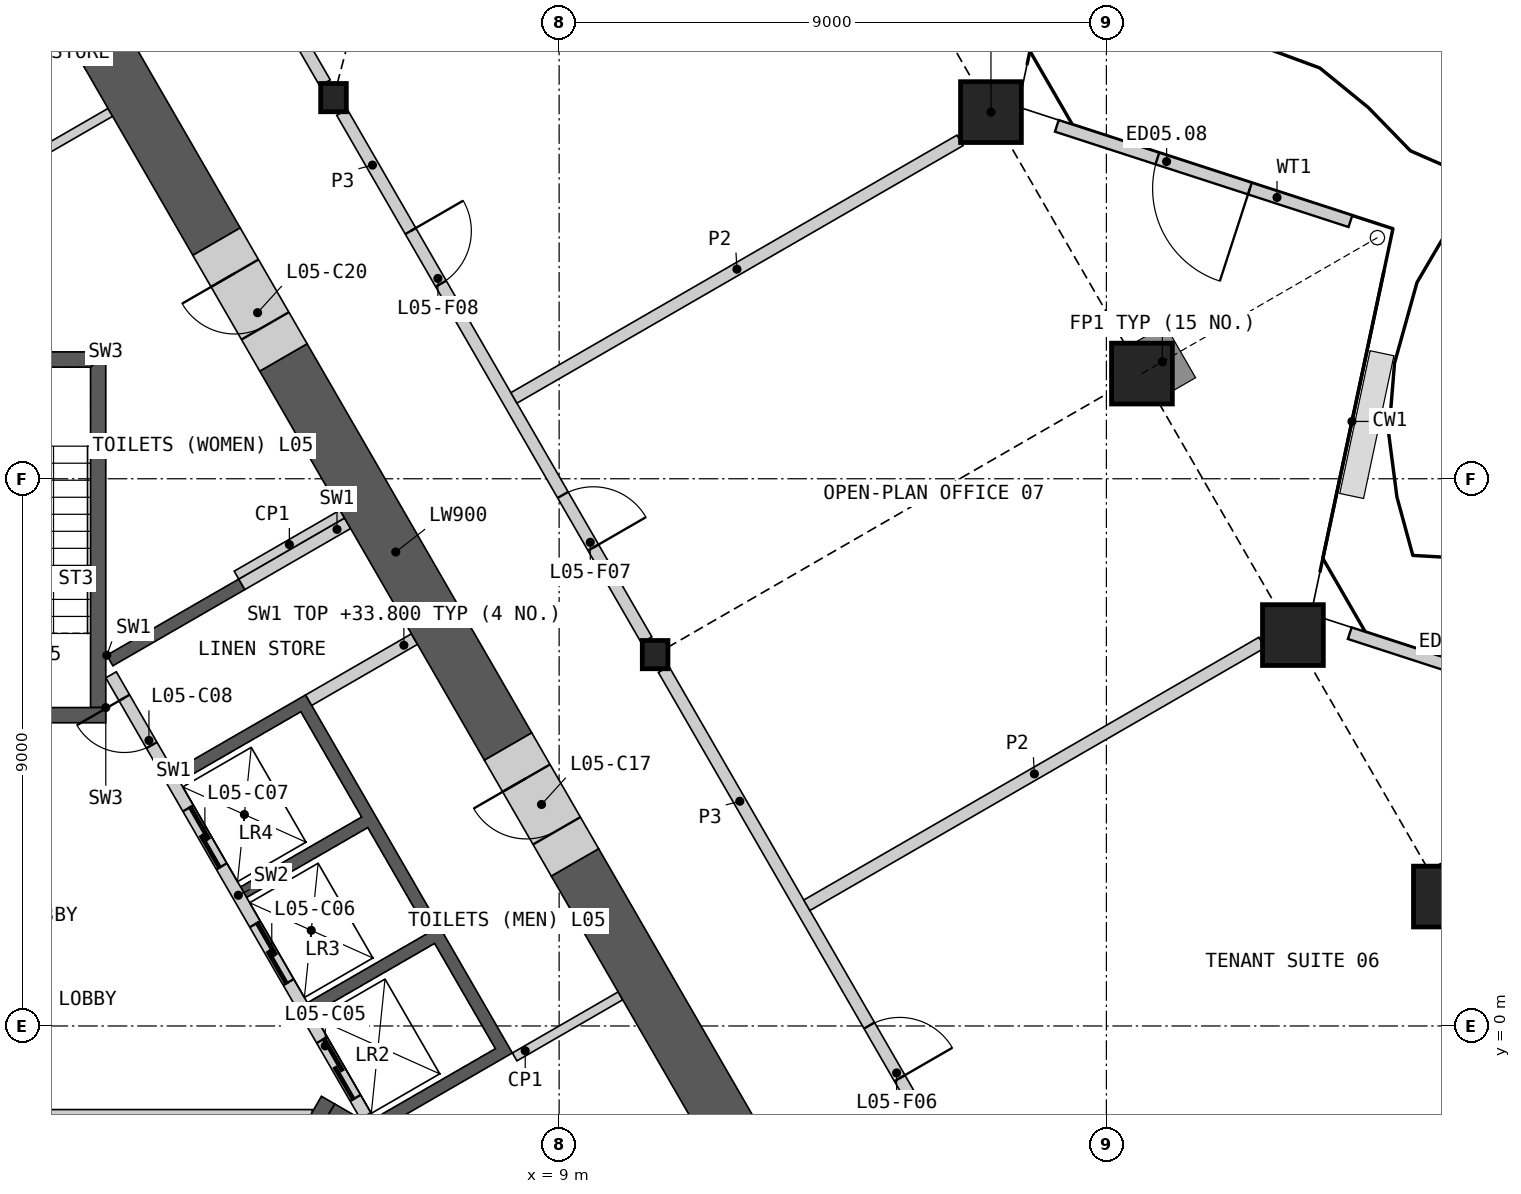
"""IFC4 building model, lengths in metres.
Left out: names, types, materials, properties, quantities, classifications, styles, units other than length and angle.
Written with IfcOpenShell. Run it as: python <this file> out.ifc"""

import sys

from ifc_helpers import new_model, si_unit, direction, frame, frame_2d, origin, origin_2d, place, context, subcontext, project, spatial, polyline, rectangle, hollow_rectangle, i_section, outline, extrude, element, fill, save


model = new_model("IFC4")
c1 = context("Model", 3, precision=1e-05, world=origin(), true_north=direction((0.0, 1.0)))
c2 = subcontext(c1, "Body", "Model", "MODEL_VIEW")
j1 = project(units=[si_unit("LENGTHUNIT", "METRE"), si_unit("PLANEANGLEUNIT", "RADIAN")], contexts=[c1])
p1 = place(None, origin())
s1 = spatial("IfcSite", under=j1, at=p1, CompositionType="ELEMENT")
p2 = place(p1, origin())
s2 = spatial("IfcBuilding", under=s1, at=p2, CompositionType="ELEMENT")
p3 = place(p2, frame((0.0, 0.0, 30.0)))
s3 = spatial("IfcBuildingStorey", under=s2, at=p3, CompositionType="ELEMENT", Elevation=30.0)
p4 = place(p3, frame((23.551, 2.128, 0.0), z_axis=(0.631248593533, 0.36445433234, 0.684615405028), x_axis=(-0.500002867593, 0.866023748172, 0.0)))
e1 = element("IfcColumn", 1, at=p4, inside=s3, PredefinedType="COLUMN", context=c2, shape_type="SweptSolid", body=[
    extrude(hollow_rectangle(XDim=1.0, YDim=1.0, WallThickness=0.07, at=origin_2d()), frame((0.0, 0.0, 0.532)), (0.0, 0.0, 1.0), 5.07),
])
p5 = place(p3, frame((21.068, 6.429, 0.0), z_axis=(0.0, 0.0, 1.0), x_axis=(1.0, 0.0, 0.0)))
e2 = element("IfcColumn", 2, at=p5, inside=s3, PredefinedType="COLUMN", context=c2, shape_type="SweptSolid", body=[
    extrude(hollow_rectangle(XDim=1.0, YDim=1.0, WallThickness=0.07, at=origin_2d()), origin(), (0.0, 0.0, 1.0), 4.2),
])
p6 = place(p3, frame((18.585, 10.73, 0.0), z_axis=(0.631257748816, 0.364419821328, 0.684625334313), x_axis=(-0.499961918033, 0.866047389302, 0.0)))
e3 = element("IfcColumn", 3, at=p6, inside=s3, PredefinedType="COLUMN", context=c2, shape_type="SweptSolid", body=[
    extrude(hollow_rectangle(XDim=1.0, YDim=1.0, WallThickness=0.07, at=origin_2d()), frame((0.0, 0.0, 0.532)), (0.0, 0.0, 1.0), 5.07),
])
p7 = place(p3, frame((16.102, 15.031, 0.0), z_axis=(0.0, 0.0, 1.0), x_axis=(1.0, 0.0, 0.0)))
e4 = element("IfcColumn", 4, at=p7, inside=s3, PredefinedType="COLUMN", context=c2, shape_type="SweptSolid", body=[
    extrude(hollow_rectangle(XDim=1.0, YDim=1.0, WallThickness=0.07, at=origin_2d()), origin(), (0.0, 0.0, 1.0), 4.2),
])
for number, where, z_axis, x_axis in (
    (5, (10.578, 6.107, 0.0), (0.0, 0.0, 1.0), (1.0, 0.0, 0.0)),
    (6, (5.289, 15.269, 0.0), (0.0, 0.0, 1.0), (1.0, 0.0, 0.0)),
):
    element("IfcColumn", number, at=place(p3, frame(where, z_axis=z_axis, x_axis=x_axis)), inside=s3, PredefinedType="COLUMN", context=c2, shape_type="SweptSolid", body=[
        extrude(i_section(OverallWidth=0.421, OverallDepth=0.465, WebThickness=0.045, FlangeThickness=0.072, at=origin_2d()), origin(), (0.0, 0.0, 1.0), 4.2),
    ])
p8 = place(p3, frame((26.851, 4.885, 0.0), z_axis=(0.0, 0.0, 1.0), x_axis=(-0.951055181617, 0.309021102063, 0.0)))
e7 = element("IfcWall", 7, at=p8, inside=s3, PredefinedType="SOLIDWALL", context=c2, shape_type="SweptSolid", body=[
    extrude(rectangle(XDim=5.098, YDim=0.2, at=frame_2d((2.549, 0.0))), origin(), (0.0, 0.0, 1.0), 3.189),
])
p9 = place(p8, frame((1.76, 0.0, 0.0)))
e8 = element("IfcOpeningElement", 8, at=p9, cuts=e7, PredefinedType="OPENING", context=c2, shape_type="SweptSolid", body=[
    extrude(rectangle(XDim=1.6, YDim=2.4, at=frame_2d((0.8, 1.2))), frame((0.0, 0.11, 0.0), z_axis=(0.0, -1.0, 0.0), x_axis=(1.0, 0.0, 0.0)), (0.0, 0.0, 1.0), 0.22),
])
p10 = place(p3, frame((22.013, 13.235, 0.0), z_axis=(0.0, 0.0, 1.0), x_axis=(-0.951051031059, 0.309033875687, 0.0)))
e9 = element("IfcWall", 9, at=p10, inside=s3, PredefinedType="SOLIDWALL", context=c2, shape_type="SweptSolid", body=[
    extrude(rectangle(XDim=5.077, YDim=0.2, at=frame_2d((2.538, 0.0))), origin(), (0.0, 0.0, 1.0), 3.189),
])
p11 = place(p10, frame((1.738, 0.0, 0.0)))
e10 = element("IfcOpeningElement", 10, at=p11, cuts=e9, PredefinedType="OPENING", context=c2, shape_type="SweptSolid", body=[
    extrude(rectangle(XDim=1.6, YDim=2.4, at=frame_2d((0.8, 1.2))), frame((0.0, 0.11, 0.0), z_axis=(0.0, -1.0, 0.0), x_axis=(1.0, 0.0, 0.0)), (0.0, 0.0, 1.0), 0.22),
])
p12 = place(p3, origin())
e11 = element("IfcWall", 11, at=p12, inside=s3, PredefinedType="SHEAR", context=c2, shape_type="SweptSolid", body=[
    extrude(outline(polyline([(1.561, 6.097), (3.731, 7.35), (3.831, 7.177), (1.66, 5.924), (1.561, 6.097)])), origin(), (0.0, 0.0, 1.0), 3.8),
])
p13 = place(p3, origin())
e12 = element("IfcWall", 12, at=p13, inside=s3, PredefinedType="SHEAR", context=c2, shape_type="SweptSolid", body=[
    extrude(outline(polyline([(2.66, 4.192), (4.831, 5.445), (8.231, -0.444), (6.061, -1.697), (5.96, -1.524), (7.952, -0.374), (6.952, 1.358), (4.96, 0.208), (4.861, 0.381), (6.852, 1.531), (5.852, 3.263), (3.861, 2.113), (3.76, 2.287), (5.752, 3.437), (4.752, 5.169), (2.76, 4.019), (2.66, 4.192)])), origin(), (0.0, 0.0, 1.0), 3.8),
])
p14 = place(p3, frame((5.817, -1.476, 0.0), z_axis=(0.0, 0.0, 1.0), x_axis=(-0.500002616675, 0.866023893041, 0.0)))
e13 = element("IfcWall", 13, at=p14, inside=s3, PredefinedType="SOLIDWALL", context=c2, shape_type="SweptSolid", body=[
    extrude(rectangle(XDim=8.373, YDim=0.2, at=frame_2d((4.187, 0.0))), origin(), (0.0, 0.0, 1.0), 3.8),
])
p15 = place(p14, frame((0.337, 0.0, 0.0)))
e14 = element("IfcOpeningElement", 14, at=p15, cuts=e13, PredefinedType="OPENING", context=c2, shape_type="SweptSolid", body=[
    extrude(rectangle(XDim=1.1, YDim=2.1, at=frame_2d((0.55, 1.05))), frame((0.0, 0.11, 0.0), z_axis=(0.0, -1.0, 0.0), x_axis=(1.0, 0.0, 0.0)), (0.0, 0.0, 1.0), 0.22),
])
p16 = place(p14, frame((2.537, 0.0, 0.0)))
e15 = element("IfcOpeningElement", 15, at=p16, cuts=e13, PredefinedType="OPENING", context=c2, shape_type="SweptSolid", body=[
    extrude(rectangle(XDim=1.1, YDim=2.1, at=frame_2d((0.55, 1.05))), frame((0.0, 0.11, 0.0), z_axis=(0.0, -1.0, 0.0), x_axis=(1.0, 0.0, 0.0)), (0.0, 0.0, 1.0), 0.22),
])
p17 = place(p14, frame((4.737, 0.0, 0.0)))
e16 = element("IfcOpeningElement", 16, at=p17, cuts=e13, PredefinedType="OPENING", context=c2, shape_type="SweptSolid", body=[
    extrude(rectangle(XDim=1.1, YDim=2.1, at=frame_2d((0.55, 1.05))), frame((0.0, 0.11, 0.0), z_axis=(0.0, -1.0, 0.0), x_axis=(1.0, 0.0, 0.0)), (0.0, 0.0, 1.0), 0.22),
])
p18 = place(p14, frame((7.037, 0.0, 0.0)))
e17 = element("IfcOpeningElement", 17, at=p18, cuts=e13, PredefinedType="OPENING", context=c2, shape_type="SweptSolid", body=[
    extrude(rectangle(XDim=0.9, YDim=2.1, at=frame_2d((0.45, 1.05))), frame((0.0, 0.11, 0.0), z_axis=(0.0, -1.0, 0.0), x_axis=(1.0, 0.0, 0.0)), (0.0, 0.0, 1.0), 0.22),
])
p19 = place(p3, frame((4.881, 5.358, 0.0), z_axis=(0.0, 0.0, 1.0), x_axis=(0.866035824272, 0.499981950752, 0.0)))
e18 = element("IfcWall", 18, at=p19, inside=s3, PredefinedType="SHEAR", context=c2, shape_type="SweptSolid", body=[
    extrude(rectangle(XDim=2.009, YDim=0.2, at=frame_2d((1.004, 0.0))), origin(), (0.0, 0.0, 1.0), 3.8),
])
p20 = place(p3, frame((3.781, 7.263, 0.0), z_axis=(0.0, 0.0, 1.0), x_axis=(0.865983199114, 0.50007309351, 0.0)))
e19 = element("IfcWall", 19, at=p20, inside=s3, PredefinedType="SHEAR", context=c2, shape_type="SweptSolid", body=[
    extrude(rectangle(XDim=2.009, YDim=0.2, at=frame_2d((1.004, 0.0))), origin(), (0.0, 0.0, 1.0), 3.8),
])
p21 = place(p3, frame((-4.941, -1.45, 0.0), z_axis=(0.0, 0.0, 1.0), x_axis=(1.0, 0.0, 0.0)))
e20 = element("IfcWall", 20, at=p21, inside=s3, PredefinedType="PARTITIONING", context=c2, shape_type="SweptSolid", body=[
    extrude(rectangle(XDim=9.882, YDim=0.15, at=frame_2d((4.941, 0.0))), origin(), (0.0, 0.0, 1.0), 3.8),
])
p22 = place(p21, frame((4.391, 0.0, 0.0)))
e21 = element("IfcOpeningElement", 21, at=p22, cuts=e20, PredefinedType="OPENING", context=c2, shape_type="SweptSolid", body=[
    extrude(rectangle(XDim=1.1, YDim=2.1, at=frame_2d((0.55, 1.05))), frame((0.0, 0.085, 0.0), z_axis=(0.0, -1.0, 0.0), x_axis=(1.0, 0.0, 0.0)), (0.0, 0.0, 1.0), 0.17),
])
p23 = place(p3, origin())
e22 = element("IfcWall", 22, at=p23, inside=s3, PredefinedType="SHEAR", context=c2, shape_type="SweptSolid", body=[
    extrude(outline(polyline([(10.032, -4.298), (10.374, -4.206), (5.307, -1.281), (5.182, -1.498), (10.032, -4.298)])), origin(), (0.0, 0.0, 1.0), 3.8),
])
p24 = place(p3, frame((3.655, -3.893, 0.0), z_axis=(0.0, 0.0, 1.0), x_axis=(0.499982516597, 0.866035497597, 0.0)))
e23 = element("IfcWall", 23, at=p24, inside=s3, PredefinedType="SHEAR", context=c2, shape_type="SweptSolid", body=[
    extrude(rectangle(XDim=3.088, YDim=0.25, at=frame_2d((1.544, 0.0))), origin(), (0.0, 0.0, 1.0), 3.8),
])
p25 = place(p24, frame((0.994, 0.0, 0.0)))
e24 = element("IfcOpeningElement", 24, at=p25, cuts=e23, PredefinedType="OPENING", context=c2, shape_type="SweptSolid", body=[
    extrude(rectangle(XDim=1.1, YDim=2.1, at=frame_2d((0.55, 1.05))), frame((0.0, 0.135, 0.0), z_axis=(0.0, -1.0, 0.0), x_axis=(1.0, 0.0, 0.0)), (0.0, 0.0, 1.0), 0.27),
])
p26 = place(p3, origin())
e25 = element("IfcWall", 25, at=p26, inside=s3, PredefinedType="SHEAR", context=c2, shape_type="SweptSolid", body=[
    extrude(outline(polyline([(1.544, 5.237), (1.544, 11.087), (1.294, 10.837), (1.294, 5.237), (1.544, 5.237)])), origin(), (0.0, 0.0, 1.0), 3.8),
])
p27 = place(p3, origin())
e26 = element("IfcWall", 26, at=p27, inside=s3, PredefinedType="SHEAR", context=c2, shape_type="SweptSolid", body=[
    extrude(outline(polyline([(1.544, 11.087), (-1.544, 11.087), (-1.294, 10.837), (1.294, 10.837), (1.544, 11.087)])), origin(), (0.0, 0.0, 1.0), 3.8),
])
p28 = place(p3, frame((1.544, 5.112, 0.0), z_axis=(0.0, 0.0, 1.0), x_axis=(-1.0, 0.0, 0.0)))
e27 = element("IfcWall", 27, at=p28, inside=s3, PredefinedType="SHEAR", context=c2, shape_type="SweptSolid", body=[
    extrude(rectangle(XDim=3.088, YDim=0.25, at=frame_2d((1.544, 0.0))), origin(), (0.0, 0.0, 1.0), 3.8),
])
p29 = place(p28, frame((0.994, 0.0, 0.0)))
e28 = element("IfcOpeningElement", 28, at=p29, cuts=e27, PredefinedType="OPENING", context=c2, shape_type="SweptSolid", body=[
    extrude(rectangle(XDim=1.1, YDim=2.1, at=frame_2d((0.55, 1.05))), frame((0.0, 0.135, 0.0), z_axis=(0.0, -1.0, 0.0), x_axis=(1.0, 0.0, 0.0)), (0.0, 0.0, 1.0), 0.27),
])
for number, where, z_axis, x_axis in (
    (29, (3.693, 7.415, 0.0), (0.0, 0.0, 1.0), (0.866, 0.5, 0.0)),
    (30, (8.268, -0.509, 0.0), (0.0, 0.0, 1.0), (0.866, 0.5, 0.0)),
):
    element("IfcWall", number, at=place(p3, frame(where, z_axis=z_axis, x_axis=x_axis)), inside=s3, PredefinedType="PARTITIONING", context=c2, shape_type="SweptSolid", body=[
        extrude(rectangle(XDim=2.009, YDim=0.15, at=frame_2d((1.004, 0.0))), origin(), (0.0, 0.0, 1.0), 3.8),
    ])
p30 = place(p3, frame((1.619, 15.026, 0.0), z_axis=(0.0, 0.0, 1.0), x_axis=(-0.866015917575, -0.500016430238, 0.0)))
e31 = element("IfcWall", 31, at=p30, inside=s3, PredefinedType="PARTITIONING", context=c2, shape_type="SweptSolid", body=[
    extrude(rectangle(XDim=5.607, YDim=0.15, at=frame_2d((2.804, 0.0))), origin(), (0.0, 0.0, 1.0), 3.8),
])
p31 = place(p3, frame((15.831, -8.69, 0.0), z_axis=(0.0, 0.0, 1.0), x_axis=(-0.499997452939, 0.866026874326, 0.0)))
e32 = element("IfcWall", 32, at=p31, inside=s3, PredefinedType="SHEAR", context=c2, shape_type="SweptSolid", body=[
    extrude(rectangle(XDim=13.141, YDim=0.9, at=frame_2d((6.571, 0.0))), origin(), (0.0, 0.0, 1.0), 3.8),
])
p32 = place(p3, frame((8.16, 4.596, 0.0), z_axis=(0.0, 0.0, 1.0), x_axis=(-0.500012259336, 0.866018325738, 0.0)))
e33 = element("IfcWall", 33, at=p32, inside=s3, PredefinedType="SHEAR", context=c2, shape_type="SweptSolid", body=[
    extrude(rectangle(XDim=7.389, YDim=0.9, at=frame_2d((3.695, 0.0))), origin(), (0.0, 0.0, 1.0), 3.8),
])
p33 = place(p3, frame((3.365, 12.9, 0.0), z_axis=(0.0, 0.0, 1.0), x_axis=(-0.499981657175, 0.86603599376, 0.0)))
e34 = element("IfcWall", 34, at=p33, inside=s3, PredefinedType="SHEAR", context=c2, shape_type="SweptSolid", body=[
    extrude(rectangle(XDim=5.952, YDim=0.9, at=frame_2d((2.976, 0.0))), origin(), (0.0, 0.0, 1.0), 3.8),
])
p34 = place(p3, frame((9.26, 2.691, 0.0), z_axis=(0.0, 0.0, 1.0), x_axis=(-0.499946605688, 0.86605622881, 0.0)))
e35 = element("IfcWall", 35, at=p34, inside=s3, PredefinedType="SHEAR", context=c2, shape_type="SweptSolid", body=[
    extrude(rectangle(XDim=2.2, YDim=0.9, at=frame_2d((1.1, 0.0))), origin(), (0.0, 0.0, 1.0), 3.8),
])
p35 = place(p34, frame((0.6, 0.0, 0.0)))
e36 = element("IfcOpeningElement", 36, at=p35, cuts=e35, PredefinedType="OPENING", context=c2, shape_type="SweptSolid", body=[
    extrude(rectangle(XDim=1.0, YDim=2.1, at=frame_2d((0.5, 1.05))), frame((0.0, 0.46, 0.0), z_axis=(0.0, -1.0, 0.0), x_axis=(1.0, 0.0, 0.0)), (0.0, 0.0, 1.0), 0.92),
])
p36 = place(p3, frame((4.466, 10.995, 0.0), z_axis=(0.0, 0.0, 1.0), x_axis=(-0.500077893725, 0.86598042715, 0.0)))
e37 = element("IfcWall", 37, at=p36, inside=s3, PredefinedType="SHEAR", context=c2, shape_type="SweptSolid", body=[
    extrude(rectangle(XDim=2.2, YDim=0.9, at=frame_2d((1.1, 0.0))), origin(), (0.0, 0.0, 1.0), 3.8),
])
p37 = place(p36, frame((0.6, 0.0, 0.0)))
e38 = element("IfcOpeningElement", 38, at=p37, cuts=e37, PredefinedType="OPENING", context=c2, shape_type="SweptSolid", body=[
    extrude(rectangle(XDim=1.0, YDim=2.1, at=frame_2d((0.5, 1.05))), frame((0.0, 0.46, 0.0), z_axis=(0.0, -1.0, 0.0), x_axis=(1.0, 0.0, 0.0)), (0.0, 0.0, 1.0), 0.92),
])
p38 = place(p3, frame((5.429, 15.026, 0.0), z_axis=(0.0, 0.0, 1.0), x_axis=(0.50001002959, -0.86601961312, 0.0)))
e39 = element("IfcWall", 39, at=p38, inside=s3, PredefinedType="PARTITIONING", context=c2, shape_type="SweptSolid", body=[
    extrude(rectangle(XDim=10.019, YDim=0.2, at=frame_2d((5.009, 0.0))), origin(), (0.0, 0.0, 1.0), 3.8),
])
p39 = place(p38, frame((7.266, 0.0, 0.0)))
e40 = element("IfcOpeningElement", 40, at=p39, cuts=e39, PredefinedType="OPENING", context=c2, shape_type="SweptSolid", body=[
    extrude(rectangle(XDim=1.0, YDim=2.1, at=frame_2d((0.5, 1.05))), frame((0.0, 0.11, 0.0), z_axis=(0.0, -1.0, 0.0), x_axis=(1.0, 0.0, 0.0)), (0.0, 0.0, 1.0), 0.22),
])
p40 = place(p38, frame((2.254, 0.0, 0.0)))
e41 = element("IfcOpeningElement", 41, at=p40, cuts=e39, PredefinedType="OPENING", context=c2, shape_type="SweptSolid", body=[
    extrude(rectangle(XDim=1.0, YDim=2.1, at=frame_2d((0.5, 1.05))), frame((0.0, 0.11, 0.0), z_axis=(0.0, -1.0, 0.0), x_axis=(1.0, 0.0, 0.0)), (0.0, 0.0, 1.0), 0.22),
])
p41 = place(p3, frame((10.719, 5.865, 0.0), z_axis=(0.0, 0.0, 1.0), x_axis=(0.49999175339, -0.866030164915, 0.0)))
e42 = element("IfcWall", 42, at=p41, inside=s3, PredefinedType="PARTITIONING", context=c2, shape_type="SweptSolid", body=[
    extrude(rectangle(XDim=10.019, YDim=0.2, at=frame_2d((5.009, 0.0))), origin(), (0.0, 0.0, 1.0), 3.8),
])
p42 = place(p41, frame((6.764, 0.0, 0.0)))
e43 = element("IfcOpeningElement", 43, at=p42, cuts=e42, PredefinedType="OPENING", context=c2, shape_type="SweptSolid", body=[
    extrude(rectangle(XDim=1.0, YDim=2.1, at=frame_2d((0.5, 1.05))), frame((0.0, 0.11, 0.0), z_axis=(0.0, -1.0, 0.0), x_axis=(1.0, 0.0, 0.0)), (0.0, 0.0, 1.0), 0.22),
])
p43 = place(p3, frame((1.913, 21.116, 0.0), z_axis=(0.0, 0.0, 1.0), x_axis=(0.500001069878, -0.866024786089, 0.0)))
e44 = element("IfcWall", 44, at=p43, inside=s3, PredefinedType="PARTITIONING", context=c2, shape_type="SweptSolid", body=[
    extrude(rectangle(XDim=6.473, YDim=0.2, at=frame_2d((3.236, 0.0))), origin(), (0.0, 0.0, 1.0), 3.8),
])
p44 = place(p43, frame((0.96, 0.0, 0.0)))
e45 = element("IfcOpeningElement", 45, at=p44, cuts=e44, PredefinedType="OPENING", context=c2, shape_type="SweptSolid", body=[
    extrude(rectangle(XDim=1.0, YDim=2.1, at=frame_2d((0.5, 1.05))), frame((0.0, 0.11, 0.0), z_axis=(0.0, -1.0, 0.0), x_axis=(1.0, 0.0, 0.0)), (0.0, 0.0, 1.0), 0.22),
])
p45 = place(p3, frame((13.074, 1.985, 0.0), z_axis=(0.0, 0.0, 1.0), x_axis=(0.86602139752, 0.500006938989, 0.0)))
e46 = element("IfcWall", 46, at=p45, inside=s3, PredefinedType="PARTITIONING", context=c2, shape_type="SweptSolid", body=[
    extrude(rectangle(XDim=8.642, YDim=0.2, at=frame_2d((4.321, 0.0))), origin(), (0.0, 0.0, 1.0), 2.885),
])
p46 = place(p3, frame((8.256, 10.33, 0.0), z_axis=(0.0, 0.0, 1.0), x_axis=(0.866026229868, 0.499998569178, 0.0)))
e47 = element("IfcWall", 47, at=p46, inside=s3, PredefinedType="PARTITIONING", context=c2, shape_type="SweptSolid", body=[
    extrude(rectangle(XDim=8.47, YDim=0.2, at=frame_2d((4.235, 0.0))), origin(), (0.0, 0.0, 1.0), 2.885),
])
p47 = place(p11, origin())
e48 = element("IfcDoor", 48, at=p47, inside=s3, OperationType="DOUBLE_DOOR_SINGLE_SWING", PredefinedType="DOOR", context=c2, shape_type="SweptSolid", body=[
    extrude(rectangle(XDim=1.6, YDim=2.4, at=frame_2d((0.8, 1.2))), frame((0.0, 0.025, 0.0), z_axis=(0.0, -1.0, 0.0), x_axis=(1.0, 0.0, 0.0)), (0.0, 0.0, 1.0), 0.05),
])
fill(e10, e48)
p48 = place(p15, origin())
e49 = element("IfcDoor", 49, at=p48, inside=s3, OperationType="SLIDING_TO_LEFT", PredefinedType="DOOR", context=c2, shape_type="SweptSolid", body=[
    extrude(rectangle(XDim=1.1, YDim=2.1, at=frame_2d((0.55, 1.05))), frame((0.0, 0.025, 0.0), z_axis=(0.0, -1.0, 0.0), x_axis=(1.0, 0.0, 0.0)), (0.0, 0.0, 1.0), 0.05),
])
fill(e14, e49)
p49 = place(p16, origin())
e50 = element("IfcDoor", 50, at=p49, inside=s3, OperationType="SLIDING_TO_LEFT", PredefinedType="DOOR", context=c2, shape_type="SweptSolid", body=[
    extrude(rectangle(XDim=1.1, YDim=2.1, at=frame_2d((0.55, 1.05))), frame((0.0, 0.025, 0.0), z_axis=(0.0, -1.0, 0.0), x_axis=(1.0, 0.0, 0.0)), (0.0, 0.0, 1.0), 0.05),
])
fill(e15, e50)
p50 = place(p17, origin())
e51 = element("IfcDoor", 51, at=p50, inside=s3, OperationType="SLIDING_TO_LEFT", PredefinedType="DOOR", context=c2, shape_type="SweptSolid", body=[
    extrude(rectangle(XDim=1.1, YDim=2.1, at=frame_2d((0.55, 1.05))), frame((0.0, 0.025, 0.0), z_axis=(0.0, -1.0, 0.0), x_axis=(1.0, 0.0, 0.0)), (0.0, 0.0, 1.0), 0.05),
])
fill(e16, e51)
p51 = place(p18, origin())
e52 = element("IfcDoor", 52, at=p51, inside=s3, OperationType="SINGLE_SWING_RIGHT", PredefinedType="DOOR", context=c2, shape_type="SweptSolid", body=[
    extrude(rectangle(XDim=0.9, YDim=2.1, at=frame_2d((0.45, 1.05))), frame((0.0, 0.025, 0.0), z_axis=(0.0, -1.0, 0.0), x_axis=(1.0, 0.0, 0.0)), (0.0, 0.0, 1.0), 0.05),
])
fill(e17, e52)
p52 = place(p35, origin())
e53 = element("IfcDoor", 53, at=p52, inside=s3, OperationType="SINGLE_SWING_RIGHT", PredefinedType="DOOR", context=c2, shape_type="SweptSolid", body=[
    extrude(rectangle(XDim=1.0, YDim=2.1, at=frame_2d((0.5, 1.05))), frame((0.0, 0.205, 0.0), z_axis=(0.0, -1.0, 0.0), x_axis=(1.0, 0.0, 0.0)), (0.0, 0.0, 1.0), 0.05),
])
fill(e36, e53)
p53 = place(p37, origin())
e54 = element("IfcDoor", 54, at=p53, inside=s3, OperationType="SINGLE_SWING_RIGHT", PredefinedType="DOOR", context=c2, shape_type="SweptSolid", body=[
    extrude(rectangle(XDim=1.0, YDim=2.1, at=frame_2d((0.5, 1.05))), frame((0.0, 0.205, 0.0), z_axis=(0.0, -1.0, 0.0), x_axis=(1.0, 0.0, 0.0)), (0.0, 0.0, 1.0), 0.05),
])
fill(e38, e54)
p54 = place(p42, origin())
e55 = element("IfcDoor", 55, at=p54, inside=s3, OperationType="SINGLE_SWING_RIGHT", PredefinedType="DOOR", context=c2, shape_type="SweptSolid", body=[
    extrude(rectangle(XDim=1.0, YDim=2.1, at=frame_2d((0.5, 1.05))), frame((0.0, 0.025, 0.0), z_axis=(0.0, -1.0, 0.0), x_axis=(1.0, 0.0, 0.0)), (0.0, 0.0, 1.0), 0.05),
])
fill(e43, e55)
p55 = place(p39, origin())
e56 = element("IfcDoor", 56, at=p55, inside=s3, OperationType="SINGLE_SWING_RIGHT", PredefinedType="DOOR", context=c2, shape_type="SweptSolid", body=[
    extrude(rectangle(XDim=1.0, YDim=2.1, at=frame_2d((0.5, 1.05))), frame((0.0, 0.025, 0.0), z_axis=(0.0, -1.0, 0.0), x_axis=(1.0, 0.0, 0.0)), (0.0, 0.0, 1.0), 0.05),
])
fill(e40, e56)
p56 = place(p40, origin())
e57 = element("IfcDoor", 57, at=p56, inside=s3, OperationType="SINGLE_SWING_LEFT", PredefinedType="DOOR", context=c2, shape_type="SweptSolid", body=[
    extrude(rectangle(XDim=1.0, YDim=2.1, at=frame_2d((0.5, 1.05))), frame((0.0, 0.025, 0.0), z_axis=(0.0, -1.0, 0.0), x_axis=(1.0, 0.0, 0.0)), (0.0, 0.0, 1.0), 0.05),
])
fill(e41, e57)
save(model, sys.argv[1])
